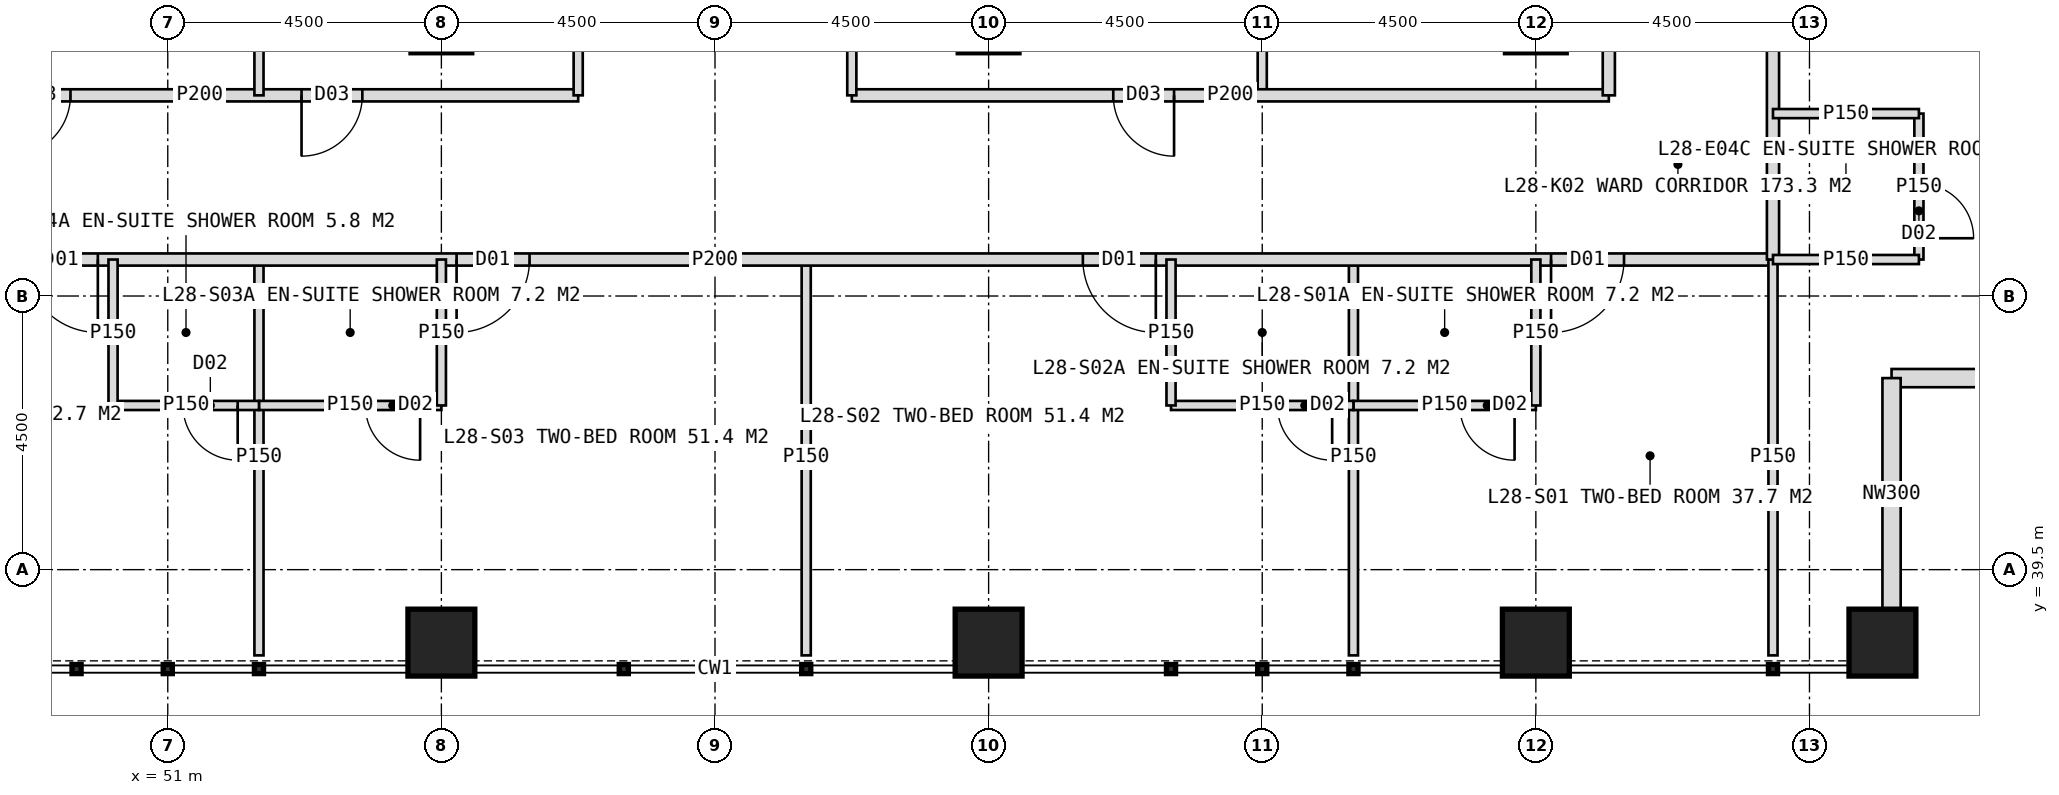
"""IFC4 building model, lengths in metres.
Left out: names, types, materials, properties, quantities, classifications, styles, units other than length and angle.
Written with IfcOpenShell. Run it as: python <this file> out.ifc"""

import sys

from ifc_helpers import new_model, si_unit, direction, frame, frame_2d, origin, origin_2d, place, context, subcontext, project, spatial, rectangle, hollow_rectangle, extrude, element, fill, save


model = new_model("IFC4")
c1 = context("Model", 3, precision=1e-05, world=origin(), true_north=direction((0.0, 1.0)))
c2 = subcontext(c1, "Body", "Model", "MODEL_VIEW")
j1 = project(units=[si_unit("LENGTHUNIT", "METRE"), si_unit("PLANEANGLEUNIT", "RADIAN")], contexts=[c1])
p1 = place(None, origin())
s1 = spatial("IfcSite", under=j1, at=p1, CompositionType="ELEMENT")
p2 = place(p1, origin())
s2 = spatial("IfcBuilding", under=s1, at=p2, CompositionType="ELEMENT")
p3 = place(p2, frame((0.0, 0.0, 120.0)))
s3 = spatial("IfcBuildingStorey", under=s2, at=p3, CompositionType="ELEMENT", Elevation=120.0)
for number, where, z_axis, x_axis in (
    (1, (55.5, 38.3, 0.0), (0.0, 0.0, 1.0), (1.0, 0.0, 0.0)),
    (2, (64.5, 38.3, 0.0), (0.0, 0.0, 1.0), (1.0, 0.0, 0.0)),
    (3, (73.5, 38.3, 0.0), (0.0, 0.0, 1.0), (1.0, 0.0, 0.0)),
    (4, (79.2, 38.3, 0.0), (0.0, 0.0, 1.0), (1.0, 0.0, 0.0)),
):
    element("IfcColumn", number, at=place(p3, frame(where, z_axis=z_axis, x_axis=x_axis)), inside=s3, PredefinedType="COLUMN", context=c2, shape_type="SweptSolid", body=[
        extrude(hollow_rectangle(XDim=1.1, YDim=1.1, WallThickness=0.1, at=origin_2d()), origin(), (0.0, 0.0, 1.0), 4.0),
    ])
for number, where, z_axis, x_axis in (
    (5, (83.15, 42.65, 0.0), (0.0, 0.0, 1.0), (-1.0, 0.0, 0.0)),
    (6, (79.35, 42.65, 0.0), (0.0, 0.0, 1.0), (0.0, -1.0, 0.0)),
):
    element("IfcWall", number, at=place(p3, frame(where, z_axis=z_axis, x_axis=x_axis)), inside=s3, PredefinedType="ELEMENTEDWALL", context=c2, shape_type="SweptSolid", body=[
        extrude(rectangle(XDim=3.8, YDim=0.3, at=frame_2d((1.9, 0.0))), origin(), (0.0, 0.0, 1.0), 4.0),
    ])
for number, where, z_axis, x_axis in (
    (7, (70.5, 44.6, 0.0), (0.0, 0.0, 1.0), (0.0, -1.0, 0.0)),
    (8, (61.5, 44.6, 0.0), (0.0, 0.0, 1.0), (0.0, -1.0, 0.0)),
    (9, (52.5, 44.6, 0.0), (0.0, 0.0, 1.0), (0.0, -1.0, 0.0)),
):
    element("IfcWall", number, at=place(p3, frame(where, z_axis=z_axis, x_axis=x_axis)), inside=s3, PredefinedType="PARTITIONING", context=c2, shape_type="SweptSolid", body=[
        extrude(rectangle(XDim=6.51, YDim=0.15, at=frame_2d((3.255, 0.0))), origin(), (0.0, 0.0, 1.0), 3.75),
    ])
p4 = place(p3, frame((77.4, 44.6, 0.0), z_axis=(0.0, 0.0, 1.0), x_axis=(-1.0, 0.0, 0.0)))
e10 = element("IfcWall", 10, at=p4, inside=s3, PredefinedType="PARTITIONING", context=c2, shape_type="SweptSolid", body=[
    extrude(rectangle(XDim=34.8, YDim=0.2, at=frame_2d((17.4, 0.0))), origin(), (0.0, 0.0, 1.0), 3.75),
])
p5 = place(p4, frame((2.45, 0.0, 0.0)))
e11 = element("IfcOpeningElement", 11, at=p5, cuts=e10, PredefinedType="OPENING", context=c2, shape_type="SweptSolid", body=[
    extrude(rectangle(XDim=1.2, YDim=2.2, at=frame_2d((0.6, 1.1))), frame((0.0, 0.11, 0.0), z_axis=(0.0, -1.0, 0.0), x_axis=(1.0, 0.0, 0.0)), (0.0, 0.0, 1.0), 0.22),
])
p6 = place(p4, frame((10.15, 0.0, 0.0)))
e12 = element("IfcOpeningElement", 12, at=p6, cuts=e10, PredefinedType="OPENING", context=c2, shape_type="SweptSolid", body=[
    extrude(rectangle(XDim=1.2, YDim=2.2, at=frame_2d((0.6, 1.1))), frame((0.0, 0.11, 0.0), z_axis=(0.0, -1.0, 0.0), x_axis=(1.0, 0.0, 0.0)), (0.0, 0.0, 1.0), 0.22),
])
p7 = place(p4, frame((20.45, 0.0, 0.0)))
e13 = element("IfcOpeningElement", 13, at=p7, cuts=e10, PredefinedType="OPENING", context=c2, shape_type="SweptSolid", body=[
    extrude(rectangle(XDim=1.2, YDim=2.2, at=frame_2d((0.6, 1.1))), frame((0.0, 0.11, 0.0), z_axis=(0.0, -1.0, 0.0), x_axis=(1.0, 0.0, 0.0)), (0.0, 0.0, 1.0), 0.22),
])
p8 = place(p4, frame((27.55, 0.0, 0.0)))
e14 = element("IfcOpeningElement", 14, at=p8, cuts=e10, PredefinedType="OPENING", context=c2, shape_type="SweptSolid", body=[
    extrude(rectangle(XDim=1.2, YDim=2.2, at=frame_2d((0.6, 1.1))), frame((0.0, 0.11, 0.0), z_axis=(0.0, -1.0, 0.0), x_axis=(1.0, 0.0, 0.0)), (0.0, 0.0, 1.0), 0.22),
])
p9 = place(p3, frame((77.4, 44.6, 0.0), z_axis=(0.0, 0.0, 1.0), x_axis=(0.0, -1.0, 0.0)))
e15 = element("IfcWall", 15, at=p9, inside=s3, PredefinedType="PARTITIONING", context=c2, shape_type="SweptSolid", body=[
    extrude(rectangle(XDim=6.51, YDim=0.15, at=frame_2d((3.255, 0.0))), origin(), (0.0, 0.0, 1.0), 3.75),
])
p10 = place(p3, frame((73.5, 42.2, 0.0), z_axis=(0.0, 0.0, 1.0), x_axis=(-1.0, 0.0, 0.0)))
e16 = element("IfcWall", 16, at=p10, inside=s3, PredefinedType="PARTITIONING", context=c2, shape_type="SweptSolid", body=[
    extrude(rectangle(XDim=3.0, YDim=0.15, at=frame_2d((1.5, 0.0))), origin(), (0.0, 0.0, 1.0), 3.75),
])
p11 = place(p10, frame((0.35, 0.0, 0.0)))
e17 = element("IfcOpeningElement", 17, at=p11, cuts=e16, PredefinedType="OPENING", context=c2, shape_type="SweptSolid", body=[
    extrude(rectangle(XDim=0.9, YDim=2.1, at=frame_2d((0.45, 1.05))), frame((0.0, 0.085, 0.0), z_axis=(0.0, -1.0, 0.0), x_axis=(1.0, 0.0, 0.0)), (0.0, 0.0, 1.0), 0.17),
])
p12 = place(p3, frame((73.5, 44.6, 0.0), z_axis=(0.0, 0.0, 1.0), x_axis=(0.0, -1.0, 0.0)))
e18 = element("IfcWall", 18, at=p12, inside=s3, PredefinedType="PARTITIONING", context=c2, shape_type="SweptSolid", body=[
    extrude(rectangle(XDim=2.4, YDim=0.15, at=frame_2d((1.2, 0.0))), origin(), (0.0, 0.0, 1.0), 2.95),
])
p13 = place(p3, frame((70.5, 42.2, 0.0), z_axis=(0.0, 0.0, 1.0), x_axis=(-1.0, 0.0, 0.0)))
e19 = element("IfcWall", 19, at=p13, inside=s3, PredefinedType="PARTITIONING", context=c2, shape_type="SweptSolid", body=[
    extrude(rectangle(XDim=3.0, YDim=0.15, at=frame_2d((1.5, 0.0))), origin(), (0.0, 0.0, 1.0), 3.75),
])
p14 = place(p13, frame((0.35, 0.0, 0.0)))
e20 = element("IfcOpeningElement", 20, at=p14, cuts=e19, PredefinedType="OPENING", context=c2, shape_type="SweptSolid", body=[
    extrude(rectangle(XDim=0.9, YDim=2.1, at=frame_2d((0.45, 1.05))), frame((0.0, 0.085, 0.0), z_axis=(0.0, -1.0, 0.0), x_axis=(1.0, 0.0, 0.0)), (0.0, 0.0, 1.0), 0.17),
])
p15 = place(p3, frame((67.5, 44.6, 0.0), z_axis=(0.0, 0.0, 1.0), x_axis=(0.0, -1.0, 0.0)))
e21 = element("IfcWall", 21, at=p15, inside=s3, PredefinedType="PARTITIONING", context=c2, shape_type="SweptSolid", body=[
    extrude(rectangle(XDim=2.4, YDim=0.15, at=frame_2d((1.2, 0.0))), origin(), (0.0, 0.0, 1.0), 3.75),
])
p16 = place(p3, frame((55.5, 42.2, 0.0), z_axis=(0.0, 0.0, 1.0), x_axis=(-1.0, 0.0, 0.0)))
e22 = element("IfcWall", 22, at=p16, inside=s3, PredefinedType="PARTITIONING", context=c2, shape_type="SweptSolid", body=[
    extrude(rectangle(XDim=3.0, YDim=0.15, at=frame_2d((1.5, 0.0))), origin(), (0.0, 0.0, 1.0), 3.75),
])
p17 = place(p16, frame((0.35, 0.0, 0.0)))
e23 = element("IfcOpeningElement", 23, at=p17, cuts=e22, PredefinedType="OPENING", context=c2, shape_type="SweptSolid", body=[
    extrude(rectangle(XDim=0.9, YDim=2.1, at=frame_2d((0.45, 1.05))), frame((0.0, 0.085, 0.0), z_axis=(0.0, -1.0, 0.0), x_axis=(1.0, 0.0, 0.0)), (0.0, 0.0, 1.0), 0.17),
])
p18 = place(p3, frame((55.5, 44.6, 0.0), z_axis=(0.0, 0.0, 1.0), x_axis=(0.0, -1.0, 0.0)))
e24 = element("IfcWall", 24, at=p18, inside=s3, PredefinedType="PARTITIONING", context=c2, shape_type="SweptSolid", body=[
    extrude(rectangle(XDim=2.4, YDim=0.15, at=frame_2d((1.2, 0.0))), origin(), (0.0, 0.0, 1.0), 2.95),
])
p19 = place(p3, frame((52.5, 42.2, 0.0), z_axis=(0.0, 0.0, 1.0), x_axis=(-1.0, 0.0, 0.0)))
e25 = element("IfcWall", 25, at=p19, inside=s3, PredefinedType="PARTITIONING", context=c2, shape_type="SweptSolid", body=[
    extrude(rectangle(XDim=2.4, YDim=0.15, at=frame_2d((1.2, 0.0))), origin(), (0.0, 0.0, 1.0), 3.75),
])
p20 = place(p19, frame((0.35, 0.0, 0.0)))
e26 = element("IfcOpeningElement", 26, at=p20, cuts=e25, PredefinedType="OPENING", context=c2, shape_type="SweptSolid", body=[
    extrude(rectangle(XDim=0.9, YDim=2.1, at=frame_2d((0.45, 1.05))), frame((0.0, 0.085, 0.0), z_axis=(0.0, -1.0, 0.0), x_axis=(1.0, 0.0, 0.0)), (0.0, 0.0, 1.0), 0.17),
])
p21 = place(p3, frame((50.1, 44.6, 0.0), z_axis=(0.0, 0.0, 1.0), x_axis=(0.0, -1.0, 0.0)))
e27 = element("IfcWall", 27, at=p21, inside=s3, PredefinedType="PARTITIONING", context=c2, shape_type="SweptSolid", body=[
    extrude(rectangle(XDim=2.4, YDim=0.15, at=frame_2d((1.2, 0.0))), origin(), (0.0, 0.0, 1.0), 3.75),
])
p22 = place(p3, frame((69.0, 53.0, 0.0), z_axis=(0.0, 0.0, 1.0), x_axis=(0.0, -1.0, 0.0)))
e28 = element("IfcWall", 28, at=p22, inside=s3, PredefinedType="PARTITIONING", context=c2, shape_type="SweptSolid", body=[
    extrude(rectangle(XDim=5.7, YDim=0.15, at=frame_2d((2.85, 0.0))), origin(), (0.0, 0.0, 1.0), 3.75),
])
p23 = place(p3, frame((74.7, 47.3, 0.0), z_axis=(0.0, 0.0, 1.0), x_axis=(-1.0, 0.0, 0.0)))
e29 = element("IfcWall", 29, at=p23, inside=s3, PredefinedType="PARTITIONING", context=c2, shape_type="SweptSolid", body=[
    extrude(rectangle(XDim=12.45, YDim=0.2, at=frame_2d((6.225, 0.0))), origin(), (0.0, 0.0, 1.0), 3.75),
])
p24 = place(p23, frame((7.15, 0.0, 0.0)))
e30 = element("IfcOpeningElement", 30, at=p24, cuts=e29, PredefinedType="OPENING", context=c2, shape_type="SweptSolid", body=[
    extrude(rectangle(XDim=1.0, YDim=2.1, at=frame_2d((0.5, 1.05))), frame((0.0, 0.11, 0.0), z_axis=(0.0, -1.0, 0.0), x_axis=(1.0, 0.0, 0.0)), (0.0, 0.0, 1.0), 0.22),
])
p25 = place(p3, frame((57.75, 47.3, 0.0), z_axis=(0.0, 0.0, 1.0), x_axis=(-1.0, 0.0, 0.0)))
e31 = element("IfcWall", 31, at=p25, inside=s3, PredefinedType="PARTITIONING", context=c2, shape_type="SweptSolid", body=[
    extrude(rectangle(XDim=12.45, YDim=0.2, at=frame_2d((6.225, 0.0))), origin(), (0.0, 0.0, 1.0), 3.75),
])
p26 = place(p25, frame((3.55, 0.0, 0.0)))
e32 = element("IfcOpeningElement", 32, at=p26, cuts=e31, PredefinedType="OPENING", context=c2, shape_type="SweptSolid", body=[
    extrude(rectangle(XDim=1.0, YDim=2.1, at=frame_2d((0.5, 1.05))), frame((0.0, 0.11, 0.0), z_axis=(0.0, -1.0, 0.0), x_axis=(1.0, 0.0, 0.0)), (0.0, 0.0, 1.0), 0.22),
])
p27 = place(p25, frame((8.35, 0.0, 0.0)))
e33 = element("IfcOpeningElement", 33, at=p27, cuts=e31, PredefinedType="OPENING", context=c2, shape_type="SweptSolid", body=[
    extrude(rectangle(XDim=1.0, YDim=2.1, at=frame_2d((0.5, 1.05))), frame((0.0, 0.11, 0.0), z_axis=(0.0, -1.0, 0.0), x_axis=(1.0, 0.0, 0.0)), (0.0, 0.0, 1.0), 0.22),
])
for number, where, z_axis, x_axis in (
    (34, (62.25, 53.0, 0.0), (0.0, 0.0, 1.0), (0.0, -1.0, 0.0)),
    (35, (57.75, 53.0, 0.0), (0.0, 0.0, 1.0), (0.0, -1.0, 0.0)),
    (36, (52.5, 53.0, 0.0), (0.0, 0.0, 1.0), (0.0, -1.0, 0.0)),
):
    element("IfcWall", number, at=place(p3, frame(where, z_axis=z_axis, x_axis=x_axis)), inside=s3, PredefinedType="PARTITIONING", context=c2, shape_type="SweptSolid", body=[
        extrude(rectangle(XDim=5.7, YDim=0.15, at=frame_2d((2.85, 0.0))), origin(), (0.0, 0.0, 1.0), 3.75),
    ])
p28 = place(p3, frame((77.4, 79.4, 0.0), z_axis=(0.0, 0.0, 1.0), x_axis=(0.0, -1.0, 0.0)))
e37 = element("IfcWall", 37, at=p28, inside=s3, PredefinedType="PARTITIONING", context=c2, shape_type="SweptSolid", body=[
    extrude(rectangle(XDim=34.8, YDim=0.2, at=frame_2d((17.4, 0.0))), origin(), (0.0, 0.0, 1.0), 3.75),
])
p29 = place(p28, frame((2.45, 0.0, 0.0)))
e38 = element("IfcOpeningElement", 38, at=p29, cuts=e37, PredefinedType="OPENING", context=c2, shape_type="SweptSolid", body=[
    extrude(rectangle(XDim=1.2, YDim=2.2, at=frame_2d((0.6, 1.1))), frame((0.0, 0.11, 0.0), z_axis=(0.0, -1.0, 0.0), x_axis=(1.0, 0.0, 0.0)), (0.0, 0.0, 1.0), 0.22),
])
p30 = place(p28, frame((10.15, 0.0, 0.0)))
e39 = element("IfcOpeningElement", 39, at=p30, cuts=e37, PredefinedType="OPENING", context=c2, shape_type="SweptSolid", body=[
    extrude(rectangle(XDim=1.2, YDim=2.2, at=frame_2d((0.6, 1.1))), frame((0.0, 0.11, 0.0), z_axis=(0.0, -1.0, 0.0), x_axis=(1.0, 0.0, 0.0)), (0.0, 0.0, 1.0), 0.22),
])
p31 = place(p28, frame((19.55, 0.0, 0.0)))
e40 = element("IfcOpeningElement", 40, at=p31, cuts=e37, PredefinedType="OPENING", context=c2, shape_type="SweptSolid", body=[
    extrude(rectangle(XDim=1.2, YDim=2.2, at=frame_2d((0.6, 1.1))), frame((0.0, 0.11, 0.0), z_axis=(0.0, -1.0, 0.0), x_axis=(1.0, 0.0, 0.0)), (0.0, 0.0, 1.0), 0.22),
])
p32 = place(p28, frame((26.05, 0.0, 0.0)))
e41 = element("IfcOpeningElement", 41, at=p32, cuts=e37, PredefinedType="OPENING", context=c2, shape_type="SweptSolid", body=[
    extrude(rectangle(XDim=1.2, YDim=2.2, at=frame_2d((0.6, 1.1))), frame((0.0, 0.11, 0.0), z_axis=(0.0, -1.0, 0.0), x_axis=(1.0, 0.0, 0.0)), (0.0, 0.0, 1.0), 0.22),
])
p33 = place(p3, frame((79.8, 47.0, 0.0), z_axis=(0.0, 0.0, 1.0), x_axis=(0.0, -1.0, 0.0)))
e42 = element("IfcWall", 42, at=p33, inside=s3, PredefinedType="PARTITIONING", context=c2, shape_type="SweptSolid", body=[
    extrude(rectangle(XDim=2.4, YDim=0.15, at=frame_2d((1.2, 0.0))), origin(), (0.0, 0.0, 1.0), 3.75),
])
p34 = place(p33, frame((1.15, 0.0, 0.0)))
e43 = element("IfcOpeningElement", 43, at=p34, cuts=e42, PredefinedType="OPENING", context=c2, shape_type="SweptSolid", body=[
    extrude(rectangle(XDim=0.9, YDim=2.1, at=frame_2d((0.45, 1.05))), frame((0.0, 0.085, 0.0), z_axis=(0.0, -1.0, 0.0), x_axis=(1.0, 0.0, 0.0)), (0.0, 0.0, 1.0), 0.17),
])
for number, where, z_axis, x_axis in (
    (44, (77.4, 47.0, 0.0), (0.0, 0.0, 1.0), (1.0, 0.0, 0.0)),
    (45, (77.4, 44.6, 0.0), (0.0, 0.0, 1.0), (1.0, 0.0, 0.0)),
):
    element("IfcWall", number, at=place(p3, frame(where, z_axis=z_axis, x_axis=x_axis)), inside=s3, PredefinedType="PARTITIONING", context=c2, shape_type="SweptSolid", body=[
        extrude(rectangle(XDim=2.4, YDim=0.15, at=frame_2d((1.2, 0.0))), origin(), (0.0, 0.0, 1.0), 3.75),
    ])
p35 = place(p3, frame((74.7, 62.0, 0.0), z_axis=(0.0, 0.0, 1.0), x_axis=(0.0, -1.0, 0.0)))
e46 = element("IfcWall", 46, at=p35, inside=s3, PredefinedType="PARTITIONING", context=c2, shape_type="SweptSolid", body=[
    extrude(rectangle(XDim=14.7, YDim=0.2, at=frame_2d((7.35, 0.0))), origin(), (0.0, 0.0, 1.0), 3.75),
])
p36 = place(p35, frame((1.45, 0.0, 0.0)))
e47 = element("IfcOpeningElement", 47, at=p36, cuts=e46, PredefinedType="OPENING", context=c2, shape_type="SweptSolid", body=[
    extrude(rectangle(XDim=1.0, YDim=2.1, at=frame_2d((0.5, 1.05))), frame((0.0, 0.11, 0.0), z_axis=(0.0, -1.0, 0.0), x_axis=(1.0, 0.0, 0.0)), (0.0, 0.0, 1.0), 0.22),
])
p37 = place(p35, frame((11.35, 0.0, 0.0)))
e48 = element("IfcOpeningElement", 48, at=p37, cuts=e46, PredefinedType="OPENING", context=c2, shape_type="SweptSolid", body=[
    extrude(rectangle(XDim=1.0, YDim=2.1, at=frame_2d((0.5, 1.05))), frame((0.0, 0.11, 0.0), z_axis=(0.0, -1.0, 0.0), x_axis=(1.0, 0.0, 0.0)), (0.0, 0.0, 1.0), 0.22),
])
p38 = place(p5, origin())
e49 = element("IfcDoor", 49, at=p38, inside=s3, OperationType="SINGLE_SWING_RIGHT", PredefinedType="DOOR", context=c2, shape_type="SweptSolid", body=[
    extrude(rectangle(XDim=1.2, YDim=2.2, at=frame_2d((0.6, 1.1))), frame((0.0, 0.025, 0.0), z_axis=(0.0, -1.0, 0.0), x_axis=(1.0, 0.0, 0.0)), (0.0, 0.0, 1.0), 0.05),
])
fill(e11, e49)
p39 = place(p11, origin())
e50 = element("IfcDoor", 50, at=p39, inside=s3, OperationType="SINGLE_SWING_LEFT", PredefinedType="DOOR", context=c2, shape_type="SweptSolid", body=[
    extrude(rectangle(XDim=0.9, YDim=2.1, at=frame_2d((0.45, 1.05))), frame((0.0, 0.025, 0.0), z_axis=(0.0, -1.0, 0.0), x_axis=(1.0, 0.0, 0.0)), (0.0, 0.0, 1.0), 0.05),
])
fill(e17, e50)
p40 = place(p6, origin())
e51 = element("IfcDoor", 51, at=p40, inside=s3, OperationType="SINGLE_SWING_LEFT", PredefinedType="DOOR", context=c2, shape_type="SweptSolid", body=[
    extrude(rectangle(XDim=1.2, YDim=2.2, at=frame_2d((0.6, 1.1))), frame((0.0, 0.025, 0.0), z_axis=(0.0, -1.0, 0.0), x_axis=(1.0, 0.0, 0.0)), (0.0, 0.0, 1.0), 0.05),
])
fill(e12, e51)
p41 = place(p14, origin())
e52 = element("IfcDoor", 52, at=p41, inside=s3, OperationType="SINGLE_SWING_LEFT", PredefinedType="DOOR", context=c2, shape_type="SweptSolid", body=[
    extrude(rectangle(XDim=0.9, YDim=2.1, at=frame_2d((0.45, 1.05))), frame((0.0, 0.025, 0.0), z_axis=(0.0, -1.0, 0.0), x_axis=(1.0, 0.0, 0.0)), (0.0, 0.0, 1.0), 0.05),
])
fill(e20, e52)
p42 = place(p7, origin())
e53 = element("IfcDoor", 53, at=p42, inside=s3, OperationType="SINGLE_SWING_RIGHT", PredefinedType="DOOR", context=c2, shape_type="SweptSolid", body=[
    extrude(rectangle(XDim=1.2, YDim=2.2, at=frame_2d((0.6, 1.1))), frame((0.0, 0.025, 0.0), z_axis=(0.0, -1.0, 0.0), x_axis=(1.0, 0.0, 0.0)), (0.0, 0.0, 1.0), 0.05),
])
fill(e13, e53)
p43 = place(p17, origin())
e54 = element("IfcDoor", 54, at=p43, inside=s3, OperationType="SINGLE_SWING_LEFT", PredefinedType="DOOR", context=c2, shape_type="SweptSolid", body=[
    extrude(rectangle(XDim=0.9, YDim=2.1, at=frame_2d((0.45, 1.05))), frame((0.0, 0.025, 0.0), z_axis=(0.0, -1.0, 0.0), x_axis=(1.0, 0.0, 0.0)), (0.0, 0.0, 1.0), 0.05),
])
fill(e23, e54)
p44 = place(p8, origin())
e55 = element("IfcDoor", 55, at=p44, inside=s3, OperationType="SINGLE_SWING_LEFT", PredefinedType="DOOR", context=c2, shape_type="SweptSolid", body=[
    extrude(rectangle(XDim=1.2, YDim=2.2, at=frame_2d((0.6, 1.1))), frame((0.0, 0.025, 0.0), z_axis=(0.0, -1.0, 0.0), x_axis=(1.0, 0.0, 0.0)), (0.0, 0.0, 1.0), 0.05),
])
fill(e14, e55)
p45 = place(p20, origin())
e56 = element("IfcDoor", 56, at=p45, inside=s3, OperationType="SINGLE_SWING_LEFT", PredefinedType="DOOR", context=c2, shape_type="SweptSolid", body=[
    extrude(rectangle(XDim=0.9, YDim=2.1, at=frame_2d((0.45, 1.05))), frame((0.0, 0.025, 0.0), z_axis=(0.0, -1.0, 0.0), x_axis=(1.0, 0.0, 0.0)), (0.0, 0.0, 1.0), 0.05),
])
fill(e26, e56)
p46 = place(p24, origin())
e57 = element("IfcDoor", 57, at=p46, inside=s3, OperationType="SINGLE_SWING_LEFT", PredefinedType="DOOR", context=c2, shape_type="SweptSolid", body=[
    extrude(rectangle(XDim=1.0, YDim=2.1, at=frame_2d((0.5, 1.05))), frame((0.0, 0.025, 0.0), z_axis=(0.0, -1.0, 0.0), x_axis=(1.0, 0.0, 0.0)), (0.0, 0.0, 1.0), 0.05),
])
fill(e30, e57)
p47 = place(p26, origin())
e58 = element("IfcDoor", 58, at=p47, inside=s3, OperationType="SINGLE_SWING_RIGHT", PredefinedType="DOOR", context=c2, shape_type="SweptSolid", body=[
    extrude(rectangle(XDim=1.0, YDim=2.1, at=frame_2d((0.5, 1.05))), frame((0.0, 0.025, 0.0), z_axis=(0.0, -1.0, 0.0), x_axis=(1.0, 0.0, 0.0)), (0.0, 0.0, 1.0), 0.05),
])
fill(e32, e58)
p48 = place(p27, origin())
e59 = element("IfcDoor", 59, at=p48, inside=s3, OperationType="SINGLE_SWING_RIGHT", PredefinedType="DOOR", context=c2, shape_type="SweptSolid", body=[
    extrude(rectangle(XDim=1.0, YDim=2.1, at=frame_2d((0.5, 1.05))), frame((0.0, 0.025, 0.0), z_axis=(0.0, -1.0, 0.0), x_axis=(1.0, 0.0, 0.0)), (0.0, 0.0, 1.0), 0.05),
])
fill(e33, e59)
p49 = place(p34, origin())
e60 = element("IfcDoor", 60, at=p49, inside=s3, OperationType="SINGLE_SWING_RIGHT", PredefinedType="DOOR", context=c2, shape_type="SweptSolid", body=[
    extrude(rectangle(XDim=0.9, YDim=2.1, at=frame_2d((0.45, 1.05))), frame((0.0, 0.025, 0.0), z_axis=(0.0, -1.0, 0.0), x_axis=(1.0, 0.0, 0.0)), (0.0, 0.0, 1.0), 0.05),
])
fill(e43, e60)
save(model, sys.argv[1])
